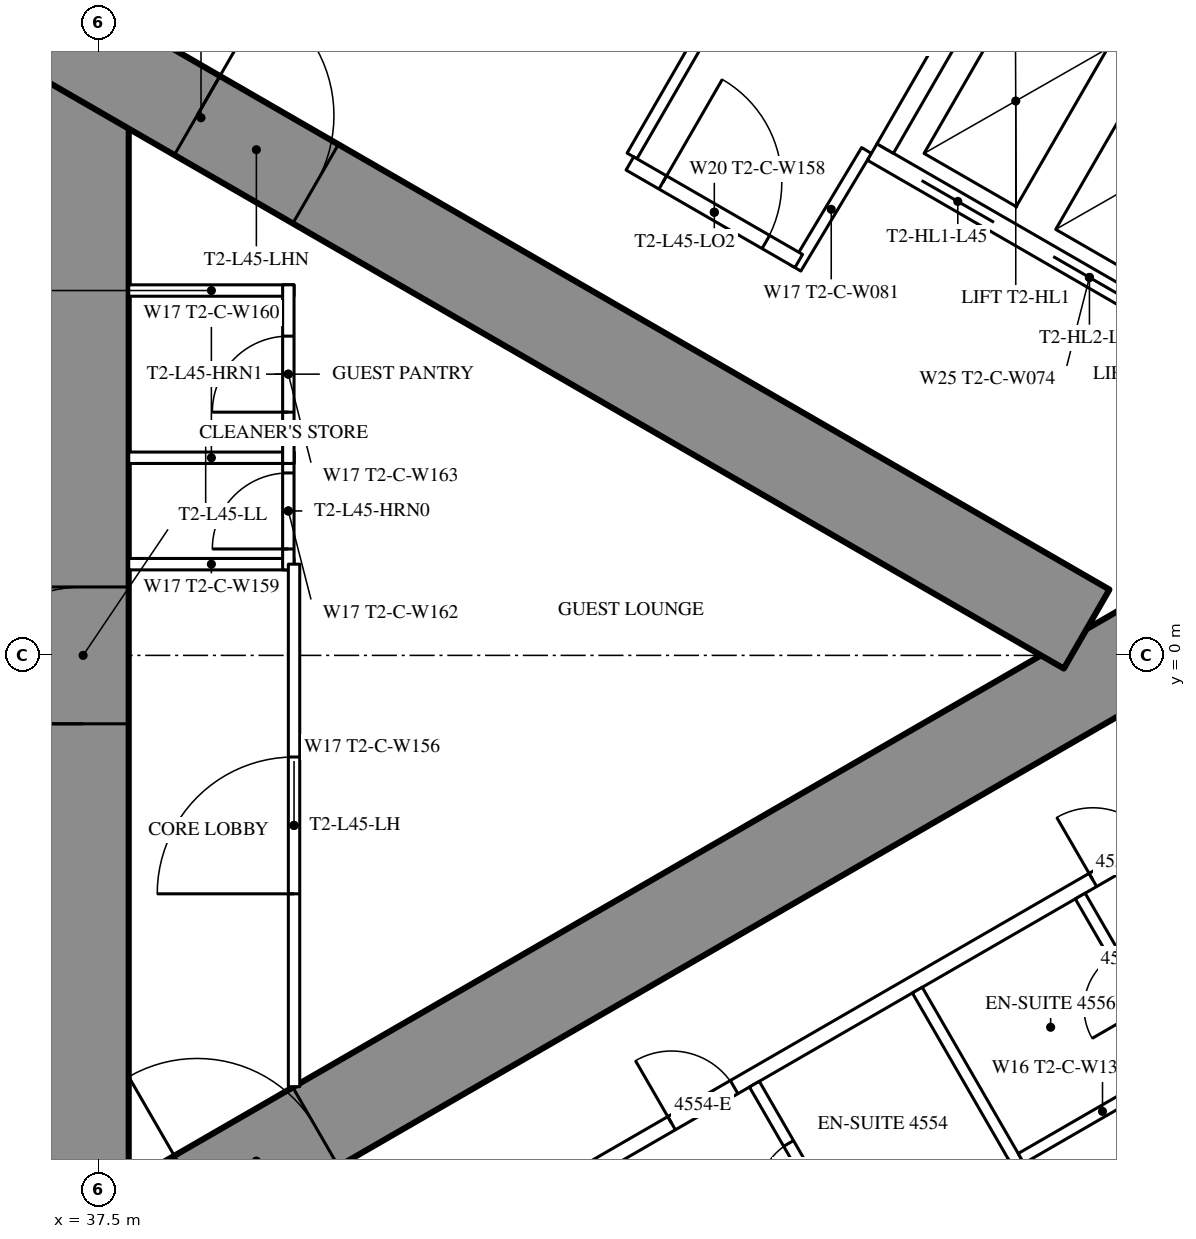
"""IFC4 building model, lengths in metres.
Left out: names, types, materials, properties, quantities, classifications, styles, units other than length and angle.
Written with IfcOpenShell. Run it as: python <this file> out.ifc"""

import sys

from ifc_helpers import new_model, si_unit, direction, frame, frame_2d, origin, place, context, subcontext, project, spatial, rectangle, extrude, element, fill, save


model = new_model("IFC4")
c1 = context("Model", 3, precision=1e-05, world=origin(), true_north=direction((0.0, 1.0)))
c2 = subcontext(c1, "Body", "Model", "MODEL_VIEW")
j1 = project(units=[si_unit("LENGTHUNIT", "METRE"), si_unit("PLANEANGLEUNIT", "RADIAN")], contexts=[c1])
p1 = place(None, origin())
s1 = spatial("IfcSite", under=j1, at=p1, CompositionType="ELEMENT")
p2 = place(p1, origin())
s2 = spatial("IfcBuilding", under=s1, at=p2, CompositionType="ELEMENT")
p3 = place(p2, frame((0.0, 0.0, 170.3)))
s3 = spatial("IfcBuildingStorey", under=s2, at=p3, CompositionType="ELEMENT", Elevation=170.3)
p4 = place(p3, frame((37.3, -8.6, 0.0), z_axis=(0.0, 0.0, 1.0), x_axis=(0.0, 1.0, 0.0)))
e1 = element("IfcWall", 1, at=p4, inside=s3, PredefinedType="SHEAR", context=c2, shape_type="SweptSolid", body=[
    extrude(rectangle(XDim=17.2, YDim=1.2, at=frame_2d((8.6, 0.0))), origin(), (0.0, 0.0, 1.0), 3.5),
])
p5 = place(p4, frame((7.7, 0.0, 0.0)))
e2 = element("IfcOpeningElement", 2, at=p5, cuts=e1, PredefinedType="OPENING", context=c2, shape_type="SweptSolid", body=[
    extrude(rectangle(XDim=1.8, YDim=2.2, at=frame_2d((0.9, 1.1))), frame((0.0, 0.61, 0.0), z_axis=(0.0, -1.0, 0.0), x_axis=(1.0, 0.0, 0.0)), (0.0, 0.0, 1.0), 1.22),
])
p6 = place(p3, frame((27.2, -13.8, 0.0), z_axis=(0.0, 0.0, 1.0), x_axis=(0.866027159892, 0.499996958321, 0.0)))
e3 = element("IfcWall", 3, at=p6, inside=s3, PredefinedType="SHEAR", context=c2, shape_type="SweptSolid", body=[
    extrude(rectangle(XDim=27.947, YDim=1.2, at=frame_2d((13.973, 0.0))), origin(), (0.0, 0.0, 1.0), 3.5),
])
p7 = place(p6, frame((4.6, 0.0, 0.0)))
e4 = element("IfcOpeningElement", 4, at=p7, cuts=e3, PredefinedType="OPENING", context=c2, shape_type="SweptSolid", body=[
    extrude(rectangle(XDim=1.0, YDim=2.2, at=frame_2d((0.5, 1.1))), frame((0.0, 0.61, 0.0), z_axis=(0.0, -1.0, 0.0), x_axis=(1.0, 0.0, 0.0)), (0.0, 0.0, 1.0), 1.22),
])
p8 = place(p6, frame((13.395, 0.0, 0.0)))
e5 = element("IfcOpeningElement", 5, at=p8, cuts=e3, PredefinedType="OPENING", context=c2, shape_type="SweptSolid", body=[
    extrude(rectangle(XDim=1.8, YDim=2.2, at=frame_2d((0.9, 1.1))), frame((0.0, 0.61, 0.0), z_axis=(0.0, -1.0, 0.0), x_axis=(1.0, 0.0, 0.0)), (0.0, 0.0, 1.0), 1.22),
])
p9 = place(p3, frame((27.2, 13.8, 0.0), z_axis=(0.0, 0.0, 1.0), x_axis=(0.866024515034, -0.500001539357, 0.0)))
e6 = element("IfcWall", 6, at=p9, inside=s3, PredefinedType="SHEAR", context=c2, shape_type="SweptSolid", body=[
    extrude(rectangle(XDim=26.907, YDim=1.2, at=frame_2d((13.454, 0.0))), origin(), (0.0, 0.0, 1.0), 3.5),
])
p10 = place(p9, frame((4.6, 0.0, 0.0)))
e7 = element("IfcOpeningElement", 7, at=p10, cuts=e6, PredefinedType="OPENING", context=c2, shape_type="SweptSolid", body=[
    extrude(rectangle(XDim=1.0, YDim=2.2, at=frame_2d((0.5, 1.1))), frame((0.0, 0.61, 0.0), z_axis=(0.0, -1.0, 0.0), x_axis=(1.0, 0.0, 0.0)), (0.0, 0.0, 1.0), 1.22),
])
p11 = place(p9, frame((13.395, 0.0, 0.0)))
e8 = element("IfcOpeningElement", 8, at=p11, cuts=e6, PredefinedType="OPENING", context=c2, shape_type="SweptSolid", body=[
    extrude(rectangle(XDim=1.8, YDim=2.2, at=frame_2d((0.9, 1.1))), frame((0.0, 0.61, 0.0), z_axis=(0.0, -1.0, 0.0), x_axis=(1.0, 0.0, 0.0)), (0.0, 0.0, 1.0), 1.22),
])
p12 = place(p3, frame((27.959, -16.017, 0.0), z_axis=(0.0, 0.0, 1.0), x_axis=(0.866024151371, 0.500002169237, 0.0)))
e9 = element("IfcWall", 9, at=p12, inside=s3, PredefinedType="PARTITIONING", context=c2, shape_type="SweptSolid", body=[
    extrude(rectangle(XDim=32.034, YDim=0.2, at=frame_2d((16.017, 0.0))), origin(), (0.0, 0.0, 1.0), 3.25),
])
p13 = place(p12, frame((4.765, 0.0, 0.0)))
e10 = element("IfcOpeningElement", 10, at=p13, cuts=e9, PredefinedType="OPENING", context=c2, shape_type="SweptSolid", body=[
    extrude(rectangle(XDim=0.95, YDim=2.2, at=frame_2d((0.475, 1.1))), frame((0.0, 0.11, 0.0), z_axis=(0.0, -1.0, 0.0), x_axis=(1.0, 0.0, 0.0)), (0.0, 0.0, 1.0), 0.22),
])
p14 = place(p12, frame((9.215, 0.0, 0.0)))
e11 = element("IfcOpeningElement", 11, at=p14, cuts=e9, PredefinedType="OPENING", context=c2, shape_type="SweptSolid", body=[
    extrude(rectangle(XDim=1.0, YDim=2.2, at=frame_2d((0.5, 1.1))), frame((0.0, 0.11, 0.0), z_axis=(0.0, -1.0, 0.0), x_axis=(1.0, 0.0, 0.0)), (0.0, 0.0, 1.0), 0.22),
])
p15 = place(p12, frame((19.725, 0.0, 0.0)))
e12 = element("IfcOpeningElement", 12, at=p15, cuts=e9, PredefinedType="OPENING", context=c2, shape_type="SweptSolid", body=[
    extrude(rectangle(XDim=0.95, YDim=2.2, at=frame_2d((0.475, 1.1))), frame((0.0, 0.11, 0.0), z_axis=(0.0, -1.0, 0.0), x_axis=(1.0, 0.0, 0.0)), (0.0, 0.0, 1.0), 0.22),
])
p16 = place(p12, frame((26.125, 0.0, 0.0)))
e13 = element("IfcOpeningElement", 13, at=p16, cuts=e9, PredefinedType="OPENING", context=c2, shape_type="SweptSolid", body=[
    extrude(rectangle(XDim=0.95, YDim=2.2, at=frame_2d((0.475, 1.1))), frame((0.0, 0.11, 0.0), z_axis=(0.0, -1.0, 0.0), x_axis=(1.0, 0.0, 0.0)), (0.0, 0.0, 1.0), 0.22),
])
p17 = place(p12, frame((28.106, 0.0, 0.0)))
e14 = element("IfcOpeningElement", 14, at=p17, cuts=e9, PredefinedType="OPENING", context=c2, shape_type="SweptSolid", body=[
    extrude(rectangle(XDim=0.95, YDim=2.2, at=frame_2d((0.475, 1.1))), frame((0.0, 0.11, 0.0), z_axis=(0.0, -1.0, 0.0), x_axis=(1.0, 0.0, 0.0)), (0.0, 0.0, 1.0), 0.22),
])
p18 = place(p3, frame((48.275, -4.404, 0.0), z_axis=(0.0, 0.0, 1.0), x_axis=(0.500006004368, -0.866021937133, 0.0)))
e15 = element("IfcWall", 15, at=p18, inside=s3, PredefinedType="PARTITIONING", context=c2, shape_type="SweptSolid", body=[
    extrude(rectangle(XDim=7.279, YDim=0.15, at=frame_2d((3.64, 0.0))), origin(), (0.0, 0.0, 1.0), 2.3),
])
p19 = place(p3, frame((44.521, 6.571, 0.0), z_axis=(0.0, 0.0, 1.0), x_axis=(0.500020376429, 0.866013639128, 0.0)))
e16 = element("IfcWall", 16, at=p19, inside=s3, PredefinedType="PARTITIONING", context=c2, shape_type="SweptSolid", body=[
    extrude(rectangle(XDim=7.306, YDim=0.15, at=frame_2d((3.653, 0.0))), origin(), (0.0, 0.0, 1.0), 2.3),
])
p20 = place(p3, frame((47.606, 6.643, 0.0), z_axis=(0.0, 0.0, 1.0), x_axis=(-0.514237157483, -0.857648031458, 0.0)))
e17 = element("IfcWall", 17, at=p20, inside=s3, PredefinedType="PARTITIONING", context=c2, shape_type="SweptSolid", body=[
    extrude(rectangle(XDim=1.805, YDim=0.15, at=frame_2d((0.902, 0.0))), origin(), (0.0, 0.0, 1.0), 3.25),
])
p21 = place(p3, frame((44.493, 6.472, 0.0), z_axis=(0.0, 0.0, 1.0), x_axis=(0.866027140358, -0.499996992154, 0.0)))
e18 = element("IfcWall", 18, at=p21, inside=s3, PredefinedType="PARTITIONING", context=c2, shape_type="SweptSolid", body=[
    extrude(rectangle(XDim=2.566, YDim=0.2, at=frame_2d((1.283, 0.0))), origin(), (0.0, 0.0, 1.0), 3.25),
])
p22 = place(p21, frame((0.5, 0.0, 0.0)))
e19 = element("IfcOpeningElement", 19, at=p22, cuts=e18, PredefinedType="OPENING", context=c2, shape_type="SweptSolid", body=[
    extrude(rectangle(XDim=1.566, YDim=2.2, at=frame_2d((0.783, 1.1))), frame((0.0, 0.11, 0.0), z_axis=(0.0, -1.0, 0.0), x_axis=(1.0, 0.0, 0.0)), (0.0, 0.0, 1.0), 0.22),
])
p23 = place(p3, frame((47.366, -7.93, 0.0), z_axis=(0.0, 0.0, 1.0), x_axis=(0.866031185235, 0.4999899861, 0.0)))
e20 = element("IfcWall", 20, at=p23, inside=s3, PredefinedType="PARTITIONING", context=c2, shape_type="SweptSolid", body=[
    extrude(rectangle(XDim=2.475, YDim=0.15, at=frame_2d((1.238, 0.0))), origin(), (0.0, 0.0, 1.0), 3.25),
])
p24 = place(p3, frame((46.131, -5.641, 0.0), z_axis=(0.0, 0.0, 1.0), x_axis=(0.49997716683, -0.86603858612, 0.0)))
e21 = element("IfcWall", 21, at=p24, inside=s3, PredefinedType="PARTITIONING", context=c2, shape_type="SweptSolid", body=[
    extrude(rectangle(XDim=2.6, YDim=0.15, at=frame_2d((1.3, 0.0))), origin(), (0.0, 0.0, 1.0), 3.25),
])
p25 = place(p24, frame((0.9, 0.0, 0.0)))
e22 = element("IfcOpeningElement", 22, at=p25, cuts=e21, PredefinedType="OPENING", context=c2, shape_type="SweptSolid", body=[
    extrude(rectangle(XDim=0.8, YDim=2.2, at=frame_2d((0.4, 1.1))), frame((0.0, 0.085, 0.0), z_axis=(0.0, -1.0, 0.0), x_axis=(1.0, 0.0, 0.0)), (0.0, 0.0, 1.0), 0.17),
])
p26 = place(p3, frame((49.64, -6.618, 0.0), z_axis=(0.0, 0.0, 1.0), x_axis=(0.866006523861, 0.500032699561, 0.0)))
e23 = element("IfcWall", 23, at=p26, inside=s3, PredefinedType="PARTITIONING", context=c2, shape_type="SweptSolid", body=[
    extrude(rectangle(XDim=2.475, YDim=0.15, at=frame_2d((1.237, 0.0))), origin(), (0.0, 0.0, 1.0), 3.25),
])
p27 = place(p3, frame((50.418, -3.166, 0.0), z_axis=(0.0, 0.0, 1.0), x_axis=(0.499936506574, -0.866062058628, 0.0)))
e24 = element("IfcWall", 24, at=p27, inside=s3, PredefinedType="PARTITIONING", context=c2, shape_type="SweptSolid", body=[
    extrude(rectangle(XDim=2.6, YDim=0.15, at=frame_2d((1.3, 0.0))), origin(), (0.0, 0.0, 1.0), 3.25),
])
p28 = place(p27, frame((0.9, 0.0, 0.0)))
e25 = element("IfcOpeningElement", 25, at=p28, cuts=e24, PredefinedType="OPENING", context=c2, shape_type="SweptSolid", body=[
    extrude(rectangle(XDim=0.8, YDim=2.2, at=frame_2d((0.4, 1.1))), frame((0.0, 0.085, 0.0), z_axis=(0.0, -1.0, 0.0), x_axis=(1.0, 0.0, 0.0)), (0.0, 0.0, 1.0), 0.17),
])
for number, where, z_axis, x_axis in (
    (26, (37.9, 1.2, 0.0), (0.0, 0.0, 1.0), (1.0, 0.0, 0.0)),
    (27, (37.9, 2.6, 0.0), (0.0, 0.0, 1.0), (1.0, 0.0, 0.0)),
    (28, (37.9, 4.8, 0.0), (0.0, 0.0, 1.0), (1.0, 0.0, 0.0)),
):
    element("IfcWall", number, at=place(p3, frame(where, z_axis=z_axis, x_axis=x_axis)), inside=s3, PredefinedType="PARTITIONING", context=c2, shape_type="SweptSolid", body=[
        extrude(rectangle(XDim=2.175, YDim=0.15, at=frame_2d((1.087, 0.0))), origin(), (0.0, 0.0, 1.0), 3.25),
    ])
p29 = place(p3, frame((40.0, 1.125, 0.0), z_axis=(0.0, 0.0, 1.0), x_axis=(0.0, 1.0, 0.0)))
e29 = element("IfcWall", 29, at=p29, inside=s3, PredefinedType="PARTITIONING", context=c2, shape_type="SweptSolid", body=[
    extrude(rectangle(XDim=1.55, YDim=0.15, at=frame_2d((0.775, 0.0))), origin(), (0.0, 0.0, 1.0), 3.25),
])
p30 = place(p29, frame((0.275, 0.0, 0.0)))
e30 = element("IfcOpeningElement", 30, at=p30, cuts=e29, PredefinedType="OPENING", context=c2, shape_type="SweptSolid", body=[
    extrude(rectangle(XDim=1.0, YDim=2.2, at=frame_2d((0.5, 1.1))), frame((0.0, 0.085, 0.0), z_axis=(0.0, -1.0, 0.0), x_axis=(1.0, 0.0, 0.0)), (0.0, 0.0, 1.0), 0.17),
])
p31 = place(p3, frame((40.0, 2.525, 0.0), z_axis=(0.0, 0.0, 1.0), x_axis=(0.0, 1.0, 0.0)))
e31 = element("IfcWall", 31, at=p31, inside=s3, PredefinedType="PARTITIONING", context=c2, shape_type="SweptSolid", body=[
    extrude(rectangle(XDim=2.35, YDim=0.15, at=frame_2d((1.175, 0.0))), origin(), (0.0, 0.0, 1.0), 3.25),
])
p32 = place(p31, frame((0.675, 0.0, 0.0)))
e32 = element("IfcOpeningElement", 32, at=p32, cuts=e31, PredefinedType="OPENING", context=c2, shape_type="SweptSolid", body=[
    extrude(rectangle(XDim=1.0, YDim=2.2, at=frame_2d((0.5, 1.1))), frame((0.0, 0.085, 0.0), z_axis=(0.0, -1.0, 0.0), x_axis=(1.0, 0.0, 0.0)), (0.0, 0.0, 1.0), 0.17),
])
p33 = place(p3, frame((40.075, -5.674, 0.0), z_axis=(0.0, 0.0, 1.0), x_axis=(0.0, 1.0, 0.0)))
e33 = element("IfcWall", 33, at=p33, inside=s3, PredefinedType="PARTITIONING", context=c2, shape_type="SweptSolid", body=[
    extrude(rectangle(XDim=6.874, YDim=0.15, at=frame_2d((3.437, 0.0))), origin(), (0.0, 0.0, 1.0), 3.25),
])
p34 = place(p33, frame((2.537, 0.0, 0.0)))
e34 = element("IfcOpeningElement", 34, at=p34, cuts=e33, PredefinedType="OPENING", context=c2, shape_type="SweptSolid", body=[
    extrude(rectangle(XDim=1.8, YDim=2.2, at=frame_2d((0.9, 1.1))), frame((0.0, 0.085, 0.0), z_axis=(0.0, -1.0, 0.0), x_axis=(1.0, 0.0, 0.0)), (0.0, 0.0, 1.0), 0.17),
])
p35 = place(p3, frame((47.681, 6.622, 0.0), z_axis=(0.0, 0.0, 1.0), x_axis=(0.86603344179, -0.499986077507, 0.0)))
e35 = element("IfcWall", 35, at=p35, inside=s3, PredefinedType="PARTITIONING", context=c2, shape_type="SweptSolid", body=[
    extrude(rectangle(XDim=6.6, YDim=0.25, at=frame_2d((3.3, 0.0))), origin(), (0.0, 0.0, 1.0), 3.25),
])
p36 = place(p35, frame((0.75, 0.0, 0.0)))
e36 = element("IfcOpeningElement", 36, at=p36, cuts=e35, PredefinedType="OPENING", context=c2, shape_type="SweptSolid", body=[
    extrude(rectangle(XDim=1.1, YDim=2.2, at=frame_2d((0.55, 1.1))), frame((0.0, 0.135, 0.0), z_axis=(0.0, -1.0, 0.0), x_axis=(1.0, 0.0, 0.0)), (0.0, 0.0, 1.0), 0.27),
])
p37 = place(p35, frame((2.75, 0.0, 0.0)))
e37 = element("IfcOpeningElement", 37, at=p37, cuts=e35, PredefinedType="OPENING", context=c2, shape_type="SweptSolid", body=[
    extrude(rectangle(XDim=1.1, YDim=2.2, at=frame_2d((0.55, 1.1))), frame((0.0, 0.135, 0.0), z_axis=(0.0, -1.0, 0.0), x_axis=(1.0, 0.0, 0.0)), (0.0, 0.0, 1.0), 0.27),
])
p38 = place(p35, frame((4.75, 0.0, 0.0)))
e38 = element("IfcOpeningElement", 38, at=p38, cuts=e35, PredefinedType="OPENING", context=c2, shape_type="SweptSolid", body=[
    extrude(rectangle(XDim=1.1, YDim=2.2, at=frame_2d((0.55, 1.1))), frame((0.0, 0.135, 0.0), z_axis=(0.0, -1.0, 0.0), x_axis=(1.0, 0.0, 0.0)), (0.0, 0.0, 1.0), 0.27),
])
p39 = place(p3, frame((49.406, 9.611, 0.0), z_axis=(0.0, 0.0, 1.0), x_axis=(0.86603344179, -0.499986077507, 0.0)))
e39 = element("IfcWall", 39, at=p39, inside=s3, PredefinedType="PARTITIONING", context=c2, shape_type="SweptSolid", body=[
    extrude(rectangle(XDim=6.6, YDim=0.25, at=frame_2d((3.3, 0.0))), origin(), (0.0, 0.0, 1.0), 3.25),
])
p40 = place(p3, frame((47.852, 6.668, 0.0), z_axis=(0.0, 0.0, 1.0), x_axis=(0.499929347863, 0.866066190972, 0.0)))
e40 = element("IfcWall", 40, at=p40, inside=s3, PredefinedType="PARTITIONING", context=c2, shape_type="SweptSolid", body=[
    extrude(rectangle(XDim=3.201, YDim=0.25, at=frame_2d((1.6, 0.0))), origin(), (0.0, 0.0, 1.0), 3.25),
])
p41 = place(p25, origin())
e41 = element("IfcDoor", 41, at=p41, inside=s3, OperationType="SINGLE_SWING_RIGHT", PredefinedType="DOOR", context=c2, shape_type="SweptSolid", body=[
    extrude(rectangle(XDim=0.8, YDim=2.2, at=frame_2d((0.4, 1.1))), frame((0.0, 0.025, 0.0), z_axis=(0.0, -1.0, 0.0), x_axis=(1.0, 0.0, 0.0)), (0.0, 0.0, 1.0), 0.05),
])
fill(e22, e41)
p42 = place(p15, origin())
e42 = element("IfcDoor", 42, at=p42, inside=s3, OperationType="SINGLE_SWING_LEFT", PredefinedType="DOOR", context=c2, shape_type="SweptSolid", body=[
    extrude(rectangle(XDim=0.95, YDim=2.2, at=frame_2d((0.475, 1.1))), frame((0.0, 0.025, 0.0), z_axis=(0.0, -1.0, 0.0), x_axis=(1.0, 0.0, 0.0)), (0.0, 0.0, 1.0), 0.05),
])
fill(e12, e42)
p43 = place(p28, origin())
e43 = element("IfcDoor", 43, at=p43, inside=s3, OperationType="SINGLE_SWING_RIGHT", PredefinedType="DOOR", context=c2, shape_type="SweptSolid", body=[
    extrude(rectangle(XDim=0.8, YDim=2.2, at=frame_2d((0.4, 1.1))), frame((0.0, 0.025, 0.0), z_axis=(0.0, -1.0, 0.0), x_axis=(1.0, 0.0, 0.0)), (0.0, 0.0, 1.0), 0.05),
])
fill(e25, e43)
p44 = place(p16, origin())
e44 = element("IfcDoor", 44, at=p44, inside=s3, OperationType="SINGLE_SWING_LEFT", PredefinedType="DOOR", context=c2, shape_type="SweptSolid", body=[
    extrude(rectangle(XDim=0.95, YDim=2.2, at=frame_2d((0.475, 1.1))), frame((0.0, 0.025, 0.0), z_axis=(0.0, -1.0, 0.0), x_axis=(1.0, 0.0, 0.0)), (0.0, 0.0, 1.0), 0.05),
])
fill(e13, e44)
p45 = place(p22, origin())
e45 = element("IfcDoor", 45, at=p45, inside=s3, OperationType="SINGLE_SWING_LEFT", PredefinedType="DOOR", context=c2, shape_type="SweptSolid", body=[
    extrude(rectangle(XDim=1.566, YDim=2.2, at=frame_2d((0.783, 1.1))), frame((0.0, 0.025, 0.0), z_axis=(0.0, -1.0, 0.0), x_axis=(1.0, 0.0, 0.0)), (0.0, 0.0, 1.0), 0.05),
])
fill(e19, e45)
p46 = place(p30, origin())
e46 = element("IfcDoor", 46, at=p46, inside=s3, OperationType="SINGLE_SWING_LEFT", PredefinedType="DOOR", context=c2, shape_type="SweptSolid", body=[
    extrude(rectangle(XDim=1.0, YDim=2.2, at=frame_2d((0.5, 1.1))), frame((0.0, 0.025, 0.0), z_axis=(0.0, -1.0, 0.0), x_axis=(1.0, 0.0, 0.0)), (0.0, 0.0, 1.0), 0.05),
])
fill(e30, e46)
p47 = place(p32, origin())
e47 = element("IfcDoor", 47, at=p47, inside=s3, OperationType="SINGLE_SWING_LEFT", PredefinedType="DOOR", context=c2, shape_type="SweptSolid", body=[
    extrude(rectangle(XDim=1.0, YDim=2.2, at=frame_2d((0.5, 1.1))), frame((0.0, 0.025, 0.0), z_axis=(0.0, -1.0, 0.0), x_axis=(1.0, 0.0, 0.0)), (0.0, 0.0, 1.0), 0.05),
])
fill(e32, e47)
p48 = place(p34, origin())
e48 = element("IfcDoor", 48, at=p48, inside=s3, OperationType="DOUBLE_DOOR_SINGLE_SWING", PredefinedType="DOOR", context=c2, shape_type="SweptSolid", body=[
    extrude(rectangle(XDim=1.8, YDim=2.2, at=frame_2d((0.9, 1.1))), frame((0.0, 0.025, 0.0), z_axis=(0.0, -1.0, 0.0), x_axis=(1.0, 0.0, 0.0)), (0.0, 0.0, 1.0), 0.05),
])
fill(e34, e48)
p49 = place(p8, origin())
e49 = element("IfcDoor", 49, at=p49, inside=s3, OperationType="DOUBLE_DOOR_SINGLE_SWING", PredefinedType="DOOR", context=c2, shape_type="SweptSolid", body=[
    extrude(rectangle(XDim=1.8, YDim=2.2, at=frame_2d((0.9, 1.1))), frame((0.0, 0.025, 0.0), z_axis=(0.0, -1.0, 0.0), x_axis=(1.0, 0.0, 0.0)), (0.0, 0.0, 1.0), 0.05),
])
fill(e5, e49)
p50 = place(p11, origin())
e50 = element("IfcDoor", 50, at=p50, inside=s3, OperationType="DOUBLE_DOOR_SINGLE_SWING", PredefinedType="DOOR", context=c2, shape_type="SweptSolid", body=[
    extrude(rectangle(XDim=1.8, YDim=2.2, at=frame_2d((0.9, 1.1))), frame((0.0, 0.025, 0.0), z_axis=(0.0, -1.0, 0.0), x_axis=(1.0, 0.0, 0.0)), (0.0, 0.0, 1.0), 0.05),
])
fill(e8, e50)
p51 = place(p5, origin())
e51 = element("IfcDoor", 51, at=p51, inside=s3, OperationType="DOUBLE_DOOR_SINGLE_SWING", PredefinedType="DOOR", context=c2, shape_type="SweptSolid", body=[
    extrude(rectangle(XDim=1.8, YDim=2.2, at=frame_2d((0.9, 1.1))), frame((0.0, 0.025, 0.0), z_axis=(0.0, -1.0, 0.0), x_axis=(1.0, 0.0, 0.0)), (0.0, 0.0, 1.0), 0.05),
])
fill(e2, e51)
p52 = place(p36, origin())
e52 = element("IfcDoor", 52, at=p52, inside=s3, OperationType="DOUBLE_DOOR_SLIDING", PredefinedType="USERDEFINED", context=c2, shape_type="SweptSolid", body=[
    extrude(rectangle(XDim=1.1, YDim=2.2, at=frame_2d((0.55, 1.1))), frame((0.0, 0.025, 0.0), z_axis=(0.0, -1.0, 0.0), x_axis=(1.0, 0.0, 0.0)), (0.0, 0.0, 1.0), 0.05),
])
fill(e36, e52)
p53 = place(p37, origin())
e53 = element("IfcDoor", 53, at=p53, inside=s3, OperationType="DOUBLE_DOOR_SLIDING", PredefinedType="USERDEFINED", context=c2, shape_type="SweptSolid", body=[
    extrude(rectangle(XDim=1.1, YDim=2.2, at=frame_2d((0.55, 1.1))), frame((0.0, 0.025, 0.0), z_axis=(0.0, -1.0, 0.0), x_axis=(1.0, 0.0, 0.0)), (0.0, 0.0, 1.0), 0.05),
])
fill(e37, e53)
save(model, sys.argv[1])
